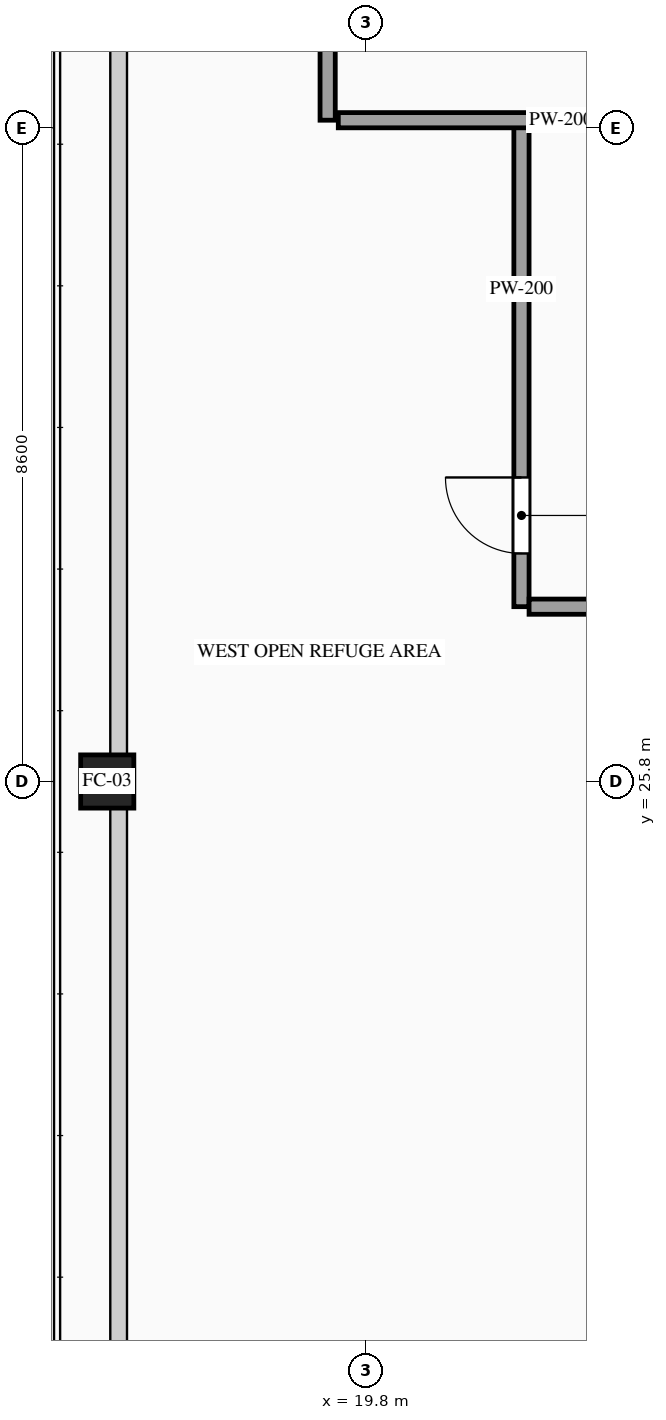
"""IFC4 building model, lengths in metres.
Left out: names, types, materials, properties, quantities, classifications, styles, units other than length and angle.
Written with IfcOpenShell. Run it as: python <this file> out.ifc"""

import sys

from ifc_helpers import new_model, si_unit, direction, frame, frame_2d, origin, origin_2d, place, context, subcontext, project, spatial, rectangle, hollow_rectangle, extrude, source, transform, mapped, element, fill, save


model = new_model("IFC4")
c1 = context("Model", 3, precision=1e-05, world=origin(), true_north=direction((0.0, 1.0)))
c2 = subcontext(c1, "Body", "Model", "MODEL_VIEW")
j1 = project(units=[si_unit("LENGTHUNIT", "METRE"), si_unit("PLANEANGLEUNIT", "RADIAN")], contexts=[c1])
p1 = place(None, origin())
s1 = spatial("IfcSite", under=j1, at=p1, CompositionType="ELEMENT")
p2 = place(p1, origin())
s2 = spatial("IfcBuilding", under=s1, at=p2, CompositionType="ELEMENT")
p3 = place(p2, frame((0.0, 0.0, 263.5)))
s3 = spatial("IfcBuildingStorey", under=s2, at=p3, CompositionType="ELEMENT", Elevation=263.5)
m1 = source(origin(), c2, "Body", "SweptSolid", [
    extrude(hollow_rectangle(XDim=0.7, YDim=0.7, WallThickness=0.032, at=origin_2d()), origin(), (0.0, 0.0, 1.0), 4.6),
])
p4 = place(p3, frame((16.4, 25.8, 0.0), z_axis=(0.0, 0.0, 1.0), x_axis=(1.0, 0.0, 0.0)))
e1 = element("IfcColumn", 1, at=p4, inside=s3, PredefinedType="COLUMN", context=c2, shape_type="MappedRepresentation", body=[
    mapped(m1, transform((0.0, 0.0, 0.0), scale=1.0)),
])
m2 = source(origin(), c2, "Body", "SweptSolid", [
    extrude(rectangle(XDim=11.6, YDim=0.2, at=frame_2d((5.8, 0.0))), origin(), (0.0, 0.0, 1.0), 4.38),
])
p5 = place(p3, frame((19.3, 34.5, 0.0), z_axis=(0.0, 0.0, 1.0), x_axis=(0.0, 1.0, 0.0)))
e2 = element("IfcWall", 2, at=p5, inside=s3, PredefinedType="PARTITIONING", context=c2, shape_type="MappedRepresentation", body=[
    mapped(m2, transform((0.0, 0.0, 0.0), scale=1.0)),
])
p6 = place(p3, frame((21.85, 28.1, 0.0), z_axis=(0.0, 0.0, 1.0), x_axis=(0.0, 1.0, 0.0)))
e3 = element("IfcWall", 3, at=p6, inside=s3, PredefinedType="PARTITIONING", context=c2, shape_type="SweptSolid", body=[
    extrude(rectangle(XDim=6.4, YDim=0.2, at=frame_2d((3.2, 0.0))), origin(), (0.0, 0.0, 1.0), 4.38),
])
p7 = place(p6, frame((0.7, 0.0, 0.0)))
e4 = element("IfcOpeningElement", 4, at=p7, cuts=e3, PredefinedType="OPENING", context=c2, shape_type="SweptSolid", body=[
    extrude(rectangle(XDim=1.0, YDim=2.2, at=frame_2d((0.5, 1.1))), frame((0.0, 0.115, 0.0), z_axis=(0.0, -1.0, 0.0), x_axis=(1.0, 0.0, 0.0)), (0.0, 0.0, 1.0), 0.23),
])
m3 = source(origin(), c2, "Body", "SweptSolid", [
    extrude(rectangle(XDim=1.555, YDim=0.2, at=frame_2d((0.777, 0.0))), origin(), (0.0, 0.0, 1.0), 4.38),
])
p8 = place(p3, frame((21.95, 28.1, 0.0), z_axis=(0.0, 0.0, 1.0), x_axis=(1.0, 0.0, 0.0)))
e5 = element("IfcWall", 5, at=p8, inside=s3, PredefinedType="PARTITIONING", context=c2, shape_type="MappedRepresentation", body=[
    mapped(m3, transform((0.0, 0.0, 0.0), scale=1.0)),
])
p9 = place(p3, frame((19.44, 34.5, 0.0), z_axis=(0.0, 0.0, 1.0), x_axis=(1.0, 0.0, 0.0)))
e6 = element("IfcWall", 6, at=p9, inside=s3, PredefinedType="PARTITIONING", context=c2, shape_type="SweptSolid", body=[
    extrude(rectangle(XDim=9.131, YDim=0.2, at=frame_2d((4.565, 0.0))), origin(), (0.0, 0.0, 1.0), 4.38),
])
p10 = place(p9, frame((6.11, 0.0, 0.0)))
e7 = element("IfcOpeningElement", 7, at=p10, cuts=e6, PredefinedType="OPENING", context=c2, shape_type="SweptSolid", body=[
    extrude(rectangle(XDim=1.5, YDim=2.3, at=frame_2d((0.75, 1.15))), frame((0.0, 0.115, 0.0), z_axis=(0.0, -1.0, 0.0), x_axis=(1.0, 0.0, 0.0)), (0.0, 0.0, 1.0), 0.23),
])
m4 = source(origin(), c2, "Body", "SweptSolid", [
    extrude(rectangle(XDim=1.0, YDim=2.2, at=frame_2d((0.5, 1.1))), frame((0.0, 0.025, 0.0), z_axis=(0.0, -1.0, 0.0), x_axis=(1.0, 0.0, 0.0)), (0.0, 0.0, 1.0), 0.05),
])
p11 = place(p7, origin())
e8 = element("IfcDoor", 8, at=p11, inside=s3, OperationType="SINGLE_SWING_RIGHT", PredefinedType="DOOR", context=c2, shape_type="MappedRepresentation", body=[
    mapped(m4, transform((0.0, 0.0, 0.0), scale=1.0)),
])
fill(e4, e8)
save(model, sys.argv[1])
